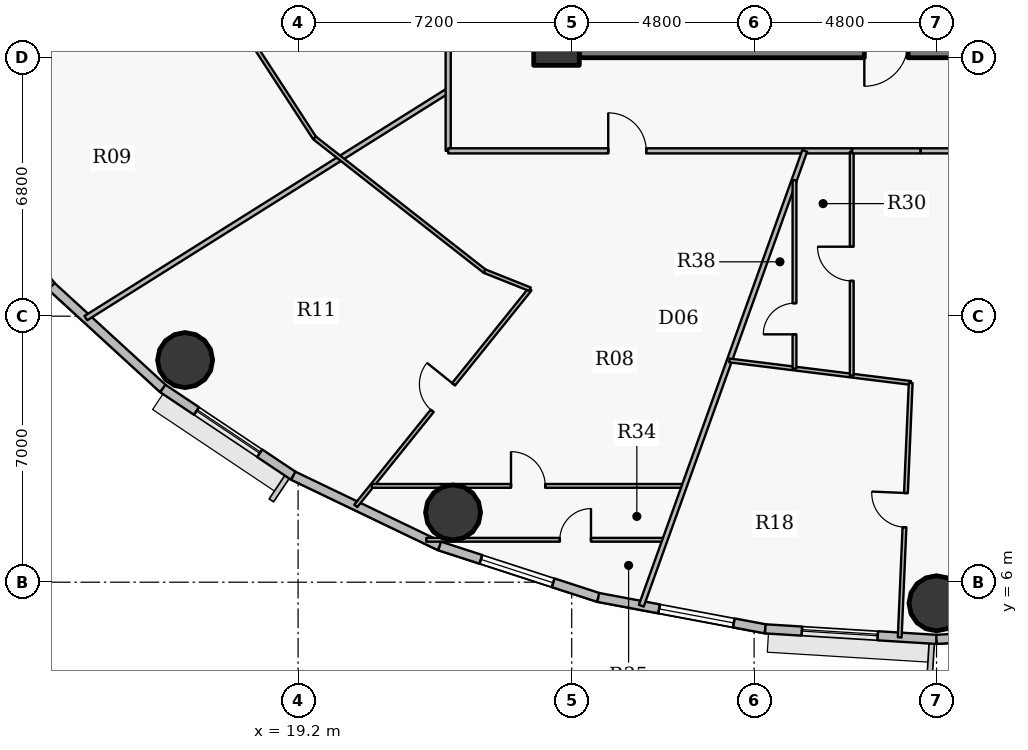
"""IFC4 building model, lengths in metres.
Left out: names, types, materials, properties, quantities, classifications, styles, units other than length and angle.
Written with IfcOpenShell. Run it as: python <this file> out.ifc"""

import sys

from ifc_helpers import new_model, si_unit, direction, frame, frame_2d, origin, origin_2d, place, context, subcontext, project, spatial, rectangle, hollow_circle, extrude, source, transform, mapped, element, fill, save


model = new_model("IFC4")
c1 = context("Model", 3, precision=1e-05, world=origin(), true_north=direction((0.0, 1.0)))
c2 = subcontext(c1, "Body", "Model", "MODEL_VIEW")
j1 = project(units=[si_unit("LENGTHUNIT", "METRE"), si_unit("PLANEANGLEUNIT", "RADIAN")], contexts=[c1])
p1 = place(None, origin())
s1 = spatial("IfcSite", under=j1, at=p1, CompositionType="ELEMENT")
p2 = place(p1, origin())
s2 = spatial("IfcBuilding", under=s1, at=p2, CompositionType="ELEMENT")
p3 = place(p2, frame((0.0, 0.0, 123.45)))
s3 = spatial("IfcBuildingStorey", under=s2, at=p3, CompositionType="ELEMENT", Elevation=123.45)
p4 = place(p3, frame((26.0, 20.2, 0.0), z_axis=(0.0, 0.0, 1.0), x_axis=(1.0, 0.0, 0.0)))
e1 = element("IfcColumn", 1, at=p4, inside=s3, PredefinedType="COLUMN", context=c2, shape_type="SweptSolid", body=[
    extrude(rectangle(XDim=1.2, YDim=1.2, at=origin_2d()), origin(), (0.0, 0.0, 1.0), 3.75),
])
p5 = place(p3, frame((45.4, 20.2, 0.0), z_axis=(0.0, 0.0, 1.0), x_axis=(-1.0, 0.0, 0.0)))
e2 = element("IfcWall", 2, at=p5, inside=s3, PredefinedType="SHEAR", context=c2, shape_type="SweptSolid", body=[
    extrude(rectangle(XDim=18.8, YDim=0.8, at=frame_2d((9.4, 0.0))), origin(), (0.0, 0.0, 1.0), 2.95),
])
p6 = place(p5, frame((10.15, 0.0, 0.0)))
e3 = element("IfcOpeningElement", 3, at=p6, cuts=e2, PredefinedType="OPENING", context=c2, shape_type="SweptSolid", body=[
    extrude(rectangle(XDim=1.15, YDim=2.15, at=origin_2d()), frame((0.575, 0.41, 1.075), z_axis=(0.0, -1.0, 0.0), x_axis=(1.0, 0.0, 0.0)), (0.0, 0.0, 1.0), 0.82),
])
for number, where, z_axis, x_axis in (
    (4, (16.227, 11.844, 0.0), (0.0, 0.0, 1.0), (1.0, 0.0, 0.0)),
    (5, (23.278, 7.835, 0.0), (0.0, 0.0, 1.0), (1.0, 0.0, 0.0)),
    (6, (36.0, 5.445, 0.0), (0.0, 0.0, 1.0), (1.0, 0.0, 0.0)),
):
    element("IfcColumn", number, at=place(p3, frame(where, z_axis=z_axis, x_axis=x_axis)), inside=s3, PredefinedType="COLUMN", context=c2, shape_type="SweptSolid", body=[
        extrude(hollow_circle(Radius=0.725, WallThickness=0.042, at=origin_2d()), origin(), (0.0, 0.0, 1.0), 3.75),
    ])
p7 = place(p3, frame((12.711, 13.783, 0.0), z_axis=(0.0, 0.0, 1.0), x_axis=(-0.616272103517, 0.787533297345, 0.0)))
e7 = element("IfcWall", 7, at=p7, inside=s3, PredefinedType="SOLIDWALL", context=c2, shape_type="SweptSolid", body=[
    extrude(rectangle(XDim=3.823, YDim=0.24, at=frame_2d((1.912, 0.0))), origin(), (0.0, 0.0, 1.0), 3.5),
])
p8 = place(p7, frame((0.912, 0.0, 0.9)))
e8 = element("IfcOpeningElement", 8, at=p8, cuts=e7, PredefinedType="OPENING", context=c2, shape_type="SweptSolid", body=[
    extrude(rectangle(XDim=2.0, YDim=1.75, at=origin_2d()), frame((1.0, 0.13, 0.875), z_axis=(0.0, -1.0, 0.0), x_axis=(1.0, 0.0, 0.0)), (0.0, 0.0, 1.0), 0.26),
])
p9 = place(p3, frame((15.642, 11.097, 0.0), z_axis=(0.0, 0.0, 1.0), x_axis=(-0.737113356241, 0.675769117414, 0.0)))
e9 = element("IfcWall", 9, at=p9, inside=s3, PredefinedType="SOLIDWALL", context=c2, shape_type="SweptSolid", body=[
    extrude(rectangle(XDim=3.976, YDim=0.24, at=frame_2d((1.988, 0.0))), origin(), (0.0, 0.0, 1.0), 3.5),
])
p10 = place(p3, frame((19.075, 8.801, 0.0), z_axis=(0.0, 0.0, 1.0), x_axis=(-0.831221811447, 0.555940914284, 0.0)))
e10 = element("IfcWall", 10, at=p10, inside=s3, PredefinedType="SOLIDWALL", context=c2, shape_type="SweptSolid", body=[
    extrude(rectangle(XDim=4.13, YDim=0.24, at=frame_2d((2.065, 0.0))), origin(), (0.0, 0.0, 1.0), 3.5),
])
p11 = place(p10, frame((1.065, 0.0, 0.9)))
e11 = element("IfcOpeningElement", 11, at=p11, cuts=e10, PredefinedType="OPENING", context=c2, shape_type="SweptSolid", body=[
    extrude(rectangle(XDim=2.0, YDim=1.75, at=origin_2d()), frame((1.0, 0.13, 0.875), z_axis=(0.0, -1.0, 0.0), x_axis=(1.0, 0.0, 0.0)), (0.0, 0.0, 1.0), 0.26),
])
p12 = place(p3, frame((22.926, 6.953, 0.0), z_axis=(0.0, 0.0, 1.0), x_axis=(-0.901589935876, 0.432591709962, 0.0)))
e12 = element("IfcWall", 12, at=p12, inside=s3, PredefinedType="SOLIDWALL", context=c2, shape_type="SweptSolid", body=[
    extrude(rectangle(XDim=4.272, YDim=0.24, at=frame_2d((2.136, 0.0))), origin(), (0.0, 0.0, 1.0), 3.5),
])
p13 = place(p3, frame((27.1, 5.599, 0.0), z_axis=(0.0, 0.0, 1.0), x_axis=(-0.951211346073, 0.308540070495, 0.0)))
e13 = element("IfcWall", 13, at=p13, inside=s3, PredefinedType="SOLIDWALL", context=c2, shape_type="SweptSolid", body=[
    extrude(rectangle(XDim=4.388, YDim=0.24, at=frame_2d((2.194, 0.0))), origin(), (0.0, 0.0, 1.0), 3.5),
])
p14 = place(p13, frame((1.248, 0.0, 0.9)))
e14 = element("IfcOpeningElement", 14, at=p14, cuts=e13, PredefinedType="OPENING", context=c2, shape_type="SweptSolid", body=[
    extrude(rectangle(XDim=2.0, YDim=1.75, at=origin_2d()), frame((1.0, 0.13, 0.875), z_axis=(0.0, -1.0, 0.0), x_axis=(1.0, 0.0, 0.0)), (0.0, 0.0, 1.0), 0.26),
])
p15 = place(p3, frame((31.494, 4.773, 0.0), z_axis=(0.0, 0.0, 1.0), x_axis=(-0.982789252177, 0.184730305596, 0.0)))
e15 = element("IfcWall", 15, at=p15, inside=s3, PredefinedType="SOLIDWALL", context=c2, shape_type="SweptSolid", body=[
    extrude(rectangle(XDim=4.471, YDim=0.24, at=frame_2d((2.235, 0.0))), origin(), (0.0, 0.0, 1.0), 3.5),
])
p16 = place(p15, frame((0.843, 0.0, 0.9)))
e16 = element("IfcOpeningElement", 16, at=p16, cuts=e15, PredefinedType="OPENING", context=c2, shape_type="SweptSolid", body=[
    extrude(rectangle(XDim=2.0, YDim=1.75, at=origin_2d()), frame((1.0, 0.13, 0.875), z_axis=(0.0, -1.0, 0.0), x_axis=(1.0, 0.0, 0.0)), (0.0, 0.0, 1.0), 0.26),
])
p17 = place(p3, frame((36.0, 4.495, 0.0), z_axis=(0.0, 0.0, 1.0), x_axis=(-0.998107531589, 0.061492726276, 0.0)))
e17 = element("IfcWall", 17, at=p17, inside=s3, PredefinedType="SOLIDWALL", context=c2, shape_type="SweptSolid", body=[
    extrude(rectangle(XDim=4.514, YDim=0.24, at=frame_2d((2.257, 0.0))), origin(), (0.0, 0.0, 1.0), 3.5),
])
p18 = place(p17, frame((1.55, 0.0, 0.9)))
e18 = element("IfcOpeningElement", 18, at=p18, cuts=e17, PredefinedType="OPENING", context=c2, shape_type="SweptSolid", body=[
    extrude(rectangle(XDim=2.0, YDim=1.75, at=origin_2d()), frame((1.0, 0.13, 0.875), z_axis=(0.0, -1.0, 0.0), x_axis=(1.0, 0.0, 0.0)), (0.0, 0.0, 1.0), 0.26),
])
p19 = place(p3, frame((40.506, 4.773, 0.0), z_axis=(0.0, 0.0, 1.0), x_axis=(-0.998107531589, -0.061492726276, 0.0)))
e19 = element("IfcWall", 19, at=p19, inside=s3, PredefinedType="SOLIDWALL", context=c2, shape_type="SweptSolid", body=[
    extrude(rectangle(XDim=4.514, YDim=0.24, at=frame_2d((2.257, 0.0))), origin(), (0.0, 0.0, 1.0), 3.5),
])
p20 = place(p19, frame((1.257, 0.0, 0.9)))
e20 = element("IfcOpeningElement", 20, at=p20, cuts=e19, PredefinedType="OPENING", context=c2, shape_type="SweptSolid", body=[
    extrude(rectangle(XDim=2.0, YDim=1.75, at=origin_2d()), frame((1.0, 0.13, 0.875), z_axis=(0.0, -1.0, 0.0), x_axis=(1.0, 0.0, 0.0)), (0.0, 0.0, 1.0), 0.26),
])
p21 = place(p3, frame((8.763, 19.792, 0.0), z_axis=(0.0, 0.0, 1.0), x_axis=(0.96671793708, 0.255844542893, 0.0)))
e21 = element("IfcWall", 21, at=p21, inside=s3, PredefinedType="PARTITIONING", context=c2, shape_type="SweptSolid", body=[
    extrude(rectangle(XDim=8.385, YDim=0.1, at=frame_2d((4.192, 0.0))), origin(), (0.0, 0.0, 1.0), 2.935),
])
p22 = place(p21, frame((4.835, 0.0, 0.0)))
e22 = element("IfcOpeningElement", 22, at=p22, cuts=e21, PredefinedType="OPENING", context=c2, shape_type="SweptSolid", body=[
    extrude(rectangle(XDim=0.9, YDim=2.1, at=origin_2d()), frame((0.45, 0.06, 1.05), z_axis=(0.0, -1.0, 0.0), x_axis=(1.0, 0.0, 0.0)), (0.0, 0.0, 1.0), 0.12),
])
p23 = place(p3, frame((13.615, 12.948, 0.0), z_axis=(0.0, 0.0, 1.0), x_axis=(0.846963568038, 0.531650932866, 0.0)))
e23 = element("IfcWall", 23, at=p23, inside=s3, PredefinedType="PARTITIONING", context=c2, shape_type="SweptSolid", body=[
    extrude(rectangle(XDim=11.258, YDim=0.135, at=frame_2d((5.629, 0.0))), origin(), (0.0, 0.0, 1.0), 2.935),
])
p24 = place(p3, frame((16.869, 21.937, 0.0), z_axis=(0.0, 0.0, 1.0), x_axis=(0.545394651961, -0.838179380331, 0.0)))
e24 = element("IfcWall", 24, at=p24, inside=s3, PredefinedType="PARTITIONING", context=c2, shape_type="SweptSolid", body=[
    extrude(rectangle(XDim=5.068, YDim=0.1, at=frame_2d((2.534, 0.0))), origin(), (0.0, 0.0, 1.0), 3.5),
])
p25 = place(p3, frame((19.634, 17.689, 0.0), z_axis=(0.0, 0.0, 1.0), x_axis=(0.787333679705, -0.616527109544, 0.0)))
e25 = element("IfcWall", 25, at=p25, inside=s3, PredefinedType="PARTITIONING", context=c2, shape_type="SweptSolid", body=[
    extrude(rectangle(XDim=5.685, YDim=0.1, at=frame_2d((2.842, 0.0))), origin(), (0.0, 0.0, 1.0), 2.935),
])
p26 = place(p3, frame((20.717, 8.007, 0.0), z_axis=(0.0, 0.0, 1.0), x_axis=(0.626926430663, 0.779078462375, 0.0)))
e26 = element("IfcWall", 26, at=p26, inside=s3, PredefinedType="PARTITIONING", context=c2, shape_type="SweptSolid", body=[
    extrude(rectangle(XDim=7.317, YDim=0.1, at=frame_2d((3.658, 0.0))), origin(), (0.0, 0.0, 1.0), 2.935),
])
p27 = place(p26, frame((3.208, 0.0, 0.0)))
e27 = element("IfcOpeningElement", 27, at=p27, cuts=e26, PredefinedType="OPENING", context=c2, shape_type="SweptSolid", body=[
    extrude(rectangle(XDim=0.9, YDim=2.1, at=origin_2d()), frame((0.45, 0.06, 1.05), z_axis=(0.0, -1.0, 0.0), x_axis=(1.0, 0.0, 0.0)), (0.0, 0.0, 1.0), 0.12),
])
p28 = place(p3, frame((21.141, 8.534, 0.0), z_axis=(0.0, 0.0, 1.0), x_axis=(1.0, 0.0, 0.0)))
e28 = element("IfcWall", 28, at=p28, inside=s3, PredefinedType="PARTITIONING", context=c2, shape_type="SweptSolid", body=[
    extrude(rectangle(XDim=8.224, YDim=0.1, at=frame_2d((4.112, 0.0))), origin(), (0.0, 0.0, 1.0), 2.935),
])
p29 = place(p28, frame((3.662, 0.0, 0.0)))
e29 = element("IfcOpeningElement", 29, at=p29, cuts=e28, PredefinedType="OPENING", context=c2, shape_type="SweptSolid", body=[
    extrude(rectangle(XDim=0.9, YDim=2.1, at=origin_2d()), frame((0.45, 0.06, 1.05), z_axis=(0.0, -1.0, 0.0), x_axis=(1.0, 0.0, 0.0)), (0.0, 0.0, 1.0), 0.12),
])
p30 = place(p3, frame((22.574, 7.116, 0.0), z_axis=(0.0, 0.0, 1.0), x_axis=(1.0, 0.0, 0.0)))
e30 = element("IfcWall", 30, at=p30, inside=s3, PredefinedType="PARTITIONING", context=c2, shape_type="SweptSolid", body=[
    extrude(rectangle(XDim=6.281, YDim=0.1, at=frame_2d((3.141, 0.0))), origin(), (0.0, 0.0, 1.0), 2.935),
])
p31 = place(p30, frame((3.514, 0.0, 0.0)))
e31 = element("IfcOpeningElement", 31, at=p31, cuts=e30, PredefinedType="OPENING", context=c2, shape_type="SweptSolid", body=[
    extrude(rectangle(XDim=0.82, YDim=2.1, at=origin_2d()), frame((0.41, 0.06, 1.05), z_axis=(0.0, -1.0, 0.0), x_axis=(1.0, 0.0, 0.0)), (0.0, 0.0, 1.0), 0.12),
])
p32 = place(p3, frame((23.15, 17.35, 0.0), z_axis=(0.0, 0.0, 1.0), x_axis=(0.0, 1.0, 0.0)))
e32 = element("IfcWall", 32, at=p32, inside=s3, PredefinedType="PARTITIONING", context=c2, shape_type="SweptSolid", body=[
    extrude(rectangle(XDim=19.3, YDim=0.135, at=frame_2d((9.65, 0.0))), origin(), (0.0, 0.0, 1.0), 2.935),
])
p33 = place(p32, frame((16.264, 0.0, 0.0)))
e33 = element("IfcOpeningElement", 33, at=p33, cuts=e32, PredefinedType="OPENING", context=c2, shape_type="SweptSolid", body=[
    extrude(rectangle(XDim=1.0, YDim=2.15, at=origin_2d()), frame((0.5, 0.078, 1.075), z_axis=(0.0, -1.0, 0.0), x_axis=(1.0, 0.0, 0.0)), (0.0, 0.0, 1.0), 0.155),
])
p34 = place(p32, frame((7.426, 0.0, 0.0)))
e34 = element("IfcOpeningElement", 34, at=p34, cuts=e32, PredefinedType="OPENING", context=c2, shape_type="SweptSolid", body=[
    extrude(rectangle(XDim=1.0, YDim=2.15, at=origin_2d()), frame((0.5, 0.078, 1.075), z_axis=(0.0, -1.0, 0.0), x_axis=(1.0, 0.0, 0.0)), (0.0, 0.0, 1.0), 0.155),
])
p35 = place(p3, frame((23.15, 17.35, 0.0), z_axis=(0.0, 0.0, 1.0), x_axis=(1.0, 0.0, 0.0)))
e35 = element("IfcWall", 35, at=p35, inside=s3, PredefinedType="PARTITIONING", context=c2, shape_type="SweptSolid", body=[
    extrude(rectangle(XDim=10.619, YDim=0.135, at=frame_2d((5.31, 0.0))), origin(), (0.0, 0.0, 1.0), 2.935),
])
p36 = place(p35, frame((4.211, 0.0, 0.0)))
e36 = element("IfcOpeningElement", 36, at=p36, cuts=e35, PredefinedType="OPENING", context=c2, shape_type="SweptSolid", body=[
    extrude(rectangle(XDim=1.0, YDim=2.15, at=origin_2d()), frame((0.5, 0.078, 1.075), z_axis=(0.0, -1.0, 0.0), x_axis=(1.0, 0.0, 0.0)), (0.0, 0.0, 1.0), 0.155),
])
p37 = place(p3, frame((24.109, 14.184, 0.0), z_axis=(0.0, 0.0, 1.0), x_axis=(0.928816677888, -0.370539578017, 0.0)))
e37 = element("IfcWall", 37, at=p37, inside=s3, PredefinedType="PARTITIONING", context=c2, shape_type="SweptSolid", body=[
    extrude(rectangle(XDim=1.286, YDim=0.1, at=frame_2d((0.643, 0.0))), origin(), (0.0, 0.0, 1.0), 3.085),
])
p38 = place(p3, frame((28.232, 5.381, 0.0), z_axis=(0.0, 0.0, 1.0), x_axis=(0.338158615332, 0.941089130145, 0.0)))
e38 = element("IfcWall", 38, at=p38, inside=s3, PredefinedType="PARTITIONING", context=c2, shape_type="SweptSolid", body=[
    extrude(rectangle(XDim=12.718, YDim=0.135, at=frame_2d((6.359, 0.0))), origin(), (0.0, 0.0, 1.0), 2.935),
])
p39 = place(p3, frame((30.551, 11.835, 0.0), z_axis=(0.0, 0.0, 1.0), x_axis=(0.992401646286, -0.123040531728, 0.0)))
e39 = element("IfcWall", 39, at=p39, inside=s3, PredefinedType="PARTITIONING", context=c2, shape_type="SweptSolid", body=[
    extrude(rectangle(XDim=4.806, YDim=0.1, at=frame_2d((2.403, 0.0))), origin(), (0.0, 0.0, 1.0), 3.5),
])
p40 = place(p3, frame((32.262, 11.623, 0.0), z_axis=(0.0, 0.0, 1.0), x_axis=(0.0, 1.0, 0.0)))
e40 = element("IfcWall", 40, at=p40, inside=s3, PredefinedType="PARTITIONING", context=c2, shape_type="SweptSolid", body=[
    extrude(rectangle(XDim=4.955, YDim=0.1, at=frame_2d((2.478, 0.0))), origin(), (0.0, 0.0, 1.0), 3.5),
])
p41 = place(p40, frame((0.899, 0.0, 0.0)))
e41 = element("IfcOpeningElement", 41, at=p41, cuts=e40, PredefinedType="OPENING", context=c2, shape_type="SweptSolid", body=[
    extrude(rectangle(XDim=0.82, YDim=2.1, at=origin_2d()), frame((0.41, 0.06, 1.05), z_axis=(0.0, -1.0, 0.0), x_axis=(1.0, 0.0, 0.0)), (0.0, 0.0, 1.0), 0.12),
])
p42 = place(p3, frame((33.769, 11.436, 0.0), z_axis=(0.0, 0.0, 1.0), x_axis=(0.0, 1.0, 0.0)))
e42 = element("IfcWall", 42, at=p42, inside=s3, PredefinedType="PARTITIONING", context=c2, shape_type="SweptSolid", body=[
    extrude(rectangle(XDim=5.884, YDim=0.1, at=frame_2d((2.942, 0.0))), origin(), (0.0, 0.0, 1.0), 3.5),
])
p43 = place(p42, frame((2.492, 0.0, 0.0)))
e43 = element("IfcOpeningElement", 43, at=p43, cuts=e42, PredefinedType="OPENING", context=c2, shape_type="SweptSolid", body=[
    extrude(rectangle(XDim=0.9, YDim=2.1, at=origin_2d()), frame((0.45, 0.06, 1.05), z_axis=(0.0, -1.0, 0.0), x_axis=(1.0, 0.0, 0.0)), (0.0, 0.0, 1.0), 0.12),
])
p44 = place(p3, frame((35.031, 4.55, 0.0), z_axis=(0.0, 0.0, 1.0), x_axis=(0.043108301027, 0.999070405118, 0.0)))
e44 = element("IfcWall", 44, at=p44, inside=s3, PredefinedType="PARTITIONING", context=c2, shape_type="SweptSolid", body=[
    extrude(rectangle(XDim=6.7, YDim=0.1, at=frame_2d((3.35, 0.0))), origin(), (0.0, 0.0, 1.0), 2.935),
])
p45 = place(p44, frame((2.9, 0.0, 0.0)))
e45 = element("IfcOpeningElement", 45, at=p45, cuts=e44, PredefinedType="OPENING", context=c2, shape_type="SweptSolid", body=[
    extrude(rectangle(XDim=0.9, YDim=2.1, at=origin_2d()), frame((0.45, 0.06, 1.05), z_axis=(0.0, -1.0, 0.0), x_axis=(1.0, 0.0, 0.0)), (0.0, 0.0, 1.0), 0.12),
])
p46 = place(p3, frame((35.584, 17.35, 0.0), z_axis=(0.0, 0.0, 1.0), x_axis=(1.0, 0.0, 0.0)))
e46 = element("IfcWall", 46, at=p46, inside=s3, PredefinedType="PARTITIONING", context=c2, shape_type="SweptSolid", body=[
    extrude(rectangle(XDim=13.266, YDim=0.135, at=frame_2d((6.633, 0.0))), origin(), (0.0, 0.0, 1.0), 2.935),
])
p47 = place(p46, frame((2.757, 0.0, 0.0)))
e47 = element("IfcOpeningElement", 47, at=p47, cuts=e46, PredefinedType="OPENING", context=c2, shape_type="SweptSolid", body=[
    extrude(rectangle(XDim=1.0, YDim=2.15, at=origin_2d()), frame((0.5, 0.078, 1.075), z_axis=(0.0, -1.0, 0.0), x_axis=(1.0, 0.0, 0.0)), (0.0, 0.0, 1.0), 0.155),
])
p48 = place(p3, frame((35.574, 17.35, 0.0), z_axis=(0.0, 0.0, 1.0), x_axis=(-1.0, 0.0, 0.0)))
e48 = element("IfcWall", 48, at=p48, inside=s3, PredefinedType="PARTITIONING", context=c2, shape_type="SweptSolid", body=[
    extrude(rectangle(XDim=1.795, YDim=0.135, at=frame_2d((0.897, 0.0))), origin(), (0.0, 0.0, 1.0), 3.5),
])
p49 = place(p3, frame((25.6, 20.79, 0.0), z_axis=(0.0, 0.0, 1.0), x_axis=(0.0, -1.0, 0.0)))
e49 = element("IfcWall", 49, at=p49, inside=s3, PredefinedType="PARTITIONING", context=c2, shape_type="SweptSolid", body=[
    extrude(rectangle(XDim=0.99, YDim=0.135, at=frame_2d((0.495, 0.0))), origin(), (0.0, 0.0, 1.0), 3.5),
])
p50 = place(p3, frame((25.907, 19.8, 0.0), z_axis=(0.0, 0.0, 1.0), x_axis=(1.0, 0.0, 0.0)))
e50 = element("IfcWall", 50, at=p50, inside=s3, PredefinedType="PARTITIONING", context=c2, shape_type="SweptSolid", body=[
    extrude(rectangle(XDim=0.683, YDim=0.135, at=frame_2d((0.341, 0.0))), origin(), (0.0, 0.0, 1.0), 2.935),
])
m1 = source(origin(), c2, "Body", "SweptSolid", [
    extrude(rectangle(XDim=2.0, YDim=1.75, at=origin_2d()), frame((1.0, 0.03, 0.875), z_axis=(0.0, -1.0, 0.0), x_axis=(1.0, 0.0, 0.0)), (0.0, 0.0, 1.0), 0.06),
])
p51 = place(p11, origin())
e51 = element("IfcWindow", 51, at=p51, inside=s3, PartitioningType="DOUBLE_PANEL_VERTICAL", PredefinedType="WINDOW", context=c2, shape_type="MappedRepresentation", body=[
    mapped(m1, transform((0.0, 0.0, 0.0), x_axis=(1.0, 0.0, 0.0), y_axis=(0.0, 1.0, 0.0), z_axis=(0.0, 0.0, 1.0), scale=1.0)),
])
fill(e11, e51)
p52 = place(p14, origin())
e52 = element("IfcWindow", 52, at=p52, inside=s3, PartitioningType="DOUBLE_PANEL_VERTICAL", PredefinedType="WINDOW", context=c2, shape_type="MappedRepresentation", body=[
    mapped(m1, transform((0.0, 0.0, 0.0), x_axis=(1.0, 0.0, 0.0), y_axis=(0.0, 1.0, 0.0), z_axis=(0.0, 0.0, 1.0), scale=1.0)),
])
fill(e14, e52)
p53 = place(p16, origin())
e53 = element("IfcWindow", 53, at=p53, inside=s3, PartitioningType="DOUBLE_PANEL_VERTICAL", PredefinedType="WINDOW", context=c2, shape_type="MappedRepresentation", body=[
    mapped(m1, transform((0.0, 0.0, 0.0), x_axis=(1.0, 0.0, 0.0), y_axis=(0.0, 1.0, 0.0), z_axis=(0.0, 0.0, 1.0), scale=1.0)),
])
fill(e16, e53)
p54 = place(p18, origin())
e54 = element("IfcWindow", 54, at=p54, inside=s3, PartitioningType="DOUBLE_PANEL_VERTICAL", PredefinedType="WINDOW", context=c2, shape_type="MappedRepresentation", body=[
    mapped(m1, transform((0.0, 0.0, 0.0), x_axis=(1.0, 0.0, 0.0), y_axis=(0.0, 1.0, 0.0), z_axis=(0.0, 0.0, 1.0), scale=1.0)),
])
fill(e18, e54)
m2 = source(origin(), c2, "Body", "SweptSolid", [
    extrude(rectangle(XDim=1.0, YDim=2.15, at=origin_2d()), frame((0.5, 0.025, 1.075), z_axis=(0.0, -1.0, 0.0), x_axis=(1.0, 0.0, 0.0)), (0.0, 0.0, 1.0), 0.05),
])
p55 = place(p36, origin())
e55 = element("IfcDoor", 55, at=p55, inside=s3, OperationType="SINGLE_SWING_LEFT", PredefinedType="DOOR", context=c2, shape_type="MappedRepresentation", body=[
    mapped(m2, transform((0.0, 0.0, 0.0), x_axis=(1.0, 0.0, 0.0), y_axis=(0.0, 1.0, 0.0), z_axis=(0.0, 0.0, 1.0), scale=1.0)),
])
fill(e36, e55)
m3 = source(origin(), c2, "Body", "SweptSolid", [
    extrude(rectangle(XDim=0.9, YDim=2.1, at=origin_2d()), frame((0.45, 0.025, 1.05), z_axis=(0.0, -1.0, 0.0), x_axis=(1.0, 0.0, 0.0)), (0.0, 0.0, 1.0), 0.05),
])
p56 = place(p27, origin())
e56 = element("IfcDoor", 56, at=p56, inside=s3, OperationType="SINGLE_SWING_RIGHT", PredefinedType="DOOR", context=c2, shape_type="MappedRepresentation", body=[
    mapped(m3, transform((0.0, 0.0, 0.0), x_axis=(1.0, 0.0, 0.0), y_axis=(0.0, 1.0, 0.0), z_axis=(0.0, 0.0, 1.0), scale=1.0)),
])
fill(e27, e56)
p57 = place(p29, origin())
e57 = element("IfcDoor", 57, at=p57, inside=s3, OperationType="SINGLE_SWING_LEFT", PredefinedType="DOOR", context=c2, shape_type="MappedRepresentation", body=[
    mapped(m3, transform((0.0, 0.0, 0.0), x_axis=(1.0, 0.0, 0.0), y_axis=(0.0, 1.0, 0.0), z_axis=(0.0, 0.0, 1.0), scale=1.0)),
])
fill(e29, e57)
m4 = source(origin(), c2, "Body", "SweptSolid", [
    extrude(rectangle(XDim=0.82, YDim=2.1, at=origin_2d()), frame((0.41, 0.025, 1.05), z_axis=(0.0, -1.0, 0.0), x_axis=(1.0, 0.0, 0.0)), (0.0, 0.0, 1.0), 0.05),
])
p58 = place(p31, origin())
e58 = element("IfcDoor", 58, at=p58, inside=s3, OperationType="SINGLE_SWING_RIGHT", PredefinedType="DOOR", context=c2, shape_type="MappedRepresentation", body=[
    mapped(m4, transform((0.0, 0.0, 0.0), x_axis=(1.0, 0.0, 0.0), y_axis=(0.0, 1.0, 0.0), z_axis=(0.0, 0.0, 1.0), scale=1.0)),
])
fill(e31, e58)
p59 = place(p45, origin())
e59 = element("IfcDoor", 59, at=p59, inside=s3, OperationType="SINGLE_SWING_RIGHT", PredefinedType="DOOR", context=c2, shape_type="MappedRepresentation", body=[
    mapped(m3, transform((0.0, 0.0, 0.0), x_axis=(1.0, 0.0, 0.0), y_axis=(0.0, 1.0, 0.0), z_axis=(0.0, 0.0, 1.0), scale=1.0)),
])
fill(e45, e59)
p60 = place(p43, origin())
e60 = element("IfcDoor", 60, at=p60, inside=s3, OperationType="SINGLE_SWING_RIGHT", PredefinedType="DOOR", context=c2, shape_type="MappedRepresentation", body=[
    mapped(m3, transform((0.0, 0.0, 0.0), x_axis=(1.0, 0.0, 0.0), y_axis=(0.0, 1.0, 0.0), z_axis=(0.0, 0.0, 1.0), scale=1.0)),
])
fill(e43, e60)
p61 = place(p41, origin())
e61 = element("IfcDoor", 61, at=p61, inside=s3, OperationType="SINGLE_SWING_LEFT", PredefinedType="DOOR", context=c2, shape_type="MappedRepresentation", body=[
    mapped(m4, transform((0.0, 0.0, 0.0), x_axis=(1.0, 0.0, 0.0), y_axis=(0.0, 1.0, 0.0), z_axis=(0.0, 0.0, 1.0), scale=1.0)),
])
fill(e41, e61)
save(model, sys.argv[1])
